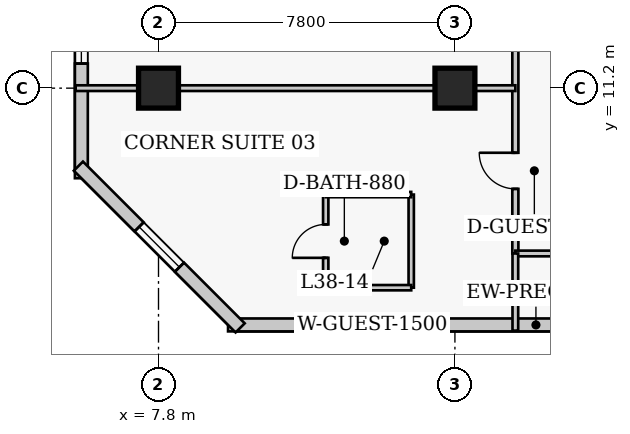
"""IFC4 building model, lengths in metres.
Left out: names, types, materials, properties, quantities, classifications, styles, units other than length and angle.
Written with IfcOpenShell. Run it as: python <this file> out.ifc"""

import sys

from ifc_helpers import new_model, si_unit, direction, frame, frame_2d, origin, origin_2d, place, context, subcontext, project, spatial, rectangle, extrude, element, fill, save


model = new_model("IFC4")
c1 = context("Model", 3, precision=1e-05, world=origin(), true_north=direction((0.0, 1.0)))
c2 = subcontext(c1, "Body", "Model", "MODEL_VIEW")
j1 = project(units=[si_unit("LENGTHUNIT", "METRE"), si_unit("PLANEANGLEUNIT", "RADIAN")], contexts=[c1])
p1 = place(None, origin())
s1 = spatial("IfcSite", under=j1, at=p1, CompositionType="ELEMENT")
p2 = place(p1, origin())
s2 = spatial("IfcBuilding", under=s1, at=p2, CompositionType="ELEMENT")
p3 = place(p2, frame((0.0, 0.0, 153.6)))
s3 = spatial("IfcBuildingStorey", under=s2, at=p3, CompositionType="ELEMENT", Elevation=153.6)
for number, where, z_axis, x_axis in (
    (1, (7.8, 11.2, 0.0), (0.0, 0.0, 1.0), (1.0, 0.0, 0.0)),
    (2, (15.6, 11.2, 0.0), (0.0, 0.0, 1.0), (1.0, 0.0, 0.0)),
):
    element("IfcColumn", number, at=place(p3, frame(where, z_axis=z_axis, x_axis=x_axis)), inside=s3, PredefinedType="COLUMN", context=c2, shape_type="SweptSolid", body=[
        extrude(rectangle(XDim=1.05, YDim=1.05, at=origin_2d()), origin(), (0.0, 0.0, 1.0), 3.8),
    ])
p4 = place(p3, frame((9.63, 4.97, 0.0), z_axis=(0.0, 0.0, 1.0), x_axis=(1.0, 0.0, 0.0)))
e3 = element("IfcWall", 3, at=p4, inside=s3, PredefinedType="SOLIDWALL", context=c2, shape_type="SweptSolid", body=[
    extrude(rectangle(XDim=26.69, YDim=0.34, at=frame_2d((13.345, 0.0))), origin(), (0.0, 0.0, 1.0), 3.55),
])
p5 = place(p4, frame((3.048, 0.0, 0.85)))
e4 = element("IfcOpeningElement", 4, at=p5, cuts=e3, PredefinedType="OPENING", context=c2, shape_type="SweptSolid", body=[
    extrude(rectangle(XDim=1.5, YDim=1.75, at=frame_2d((0.75, 0.875))), frame((0.0, 0.18, 0.0), z_axis=(0.0, -1.0, 0.0), x_axis=(1.0, 0.0, 0.0)), (0.0, 0.0, 1.0), 0.36),
])
p6 = place(p4, frame((22.642, 0.0, 0.85)))
e5 = element("IfcOpeningElement", 5, at=p6, cuts=e3, PredefinedType="OPENING", context=c2, shape_type="SweptSolid", body=[
    extrude(rectangle(XDim=1.5, YDim=1.75, at=frame_2d((0.75, 0.875))), frame((0.0, 0.18, 0.0), z_axis=(0.0, -1.0, 0.0), x_axis=(1.0, 0.0, 0.0)), (0.0, 0.0, 1.0), 0.36),
])
p7 = place(p4, frame((11.655, 0.0, 0.85)))
e6 = element("IfcOpeningElement", 6, at=p7, cuts=e3, PredefinedType="OPENING", context=c2, shape_type="SweptSolid", body=[
    extrude(rectangle(XDim=1.3, YDim=1.7, at=frame_2d((0.65, 0.85))), frame((0.0, 0.18, 0.0), z_axis=(0.0, -1.0, 0.0), x_axis=(1.0, 0.0, 0.0)), (0.0, 0.0, 1.0), 0.36),
])
p8 = place(p4, frame((16.715, 0.0, 0.85)))
e7 = element("IfcOpeningElement", 7, at=p8, cuts=e3, PredefinedType="OPENING", context=c2, shape_type="SweptSolid", body=[
    extrude(rectangle(XDim=1.3, YDim=1.7, at=frame_2d((0.65, 0.85))), frame((0.0, 0.18, 0.0), z_axis=(0.0, -1.0, 0.0), x_axis=(1.0, 0.0, 0.0)), (0.0, 0.0, 1.0), 0.36),
])
p9 = place(p3, frame((5.77, 38.97, 0.0), z_axis=(0.0, 0.0, 1.0), x_axis=(0.0, -1.0, 0.0)))
e8 = element("IfcWall", 8, at=p9, inside=s3, PredefinedType="SOLIDWALL", context=c2, shape_type="SweptSolid", body=[
    extrude(rectangle(XDim=30.14, YDim=0.34, at=frame_2d((15.07, 0.0))), origin(), (0.0, 0.0, 1.0), 3.55),
])
p10 = place(p9, frame((3.018, 0.0, 0.85)))
e9 = element("IfcOpeningElement", 9, at=p10, cuts=e8, PredefinedType="OPENING", context=c2, shape_type="SweptSolid", body=[
    extrude(rectangle(XDim=1.5, YDim=1.75, at=frame_2d((0.75, 0.875))), frame((0.0, 0.18, 0.0), z_axis=(0.0, -1.0, 0.0), x_axis=(1.0, 0.0, 0.0)), (0.0, 0.0, 1.0), 0.36),
])
p11 = place(p9, frame((10.552, 0.0, 0.85)))
e10 = element("IfcOpeningElement", 10, at=p11, cuts=e8, PredefinedType="OPENING", context=c2, shape_type="SweptSolid", body=[
    extrude(rectangle(XDim=1.5, YDim=1.75, at=frame_2d((0.75, 0.875))), frame((0.0, 0.18, 0.0), z_axis=(0.0, -1.0, 0.0), x_axis=(1.0, 0.0, 0.0)), (0.0, 0.0, 1.0), 0.36),
])
p12 = place(p9, frame((16.938, 0.0, 0.85)))
e11 = element("IfcOpeningElement", 11, at=p12, cuts=e8, PredefinedType="OPENING", context=c2, shape_type="SweptSolid", body=[
    extrude(rectangle(XDim=1.5, YDim=1.75, at=frame_2d((0.75, 0.875))), frame((0.0, 0.18, 0.0), z_axis=(0.0, -1.0, 0.0), x_axis=(1.0, 0.0, 0.0)), (0.0, 0.0, 1.0), 0.36),
])
p13 = place(p9, frame((25.623, 0.0, 0.85)))
e12 = element("IfcOpeningElement", 12, at=p13, cuts=e8, PredefinedType="OPENING", context=c2, shape_type="SweptSolid", body=[
    extrude(rectangle(XDim=1.5, YDim=1.75, at=frame_2d((0.75, 0.875))), frame((0.0, 0.18, 0.0), z_axis=(0.0, -1.0, 0.0), x_axis=(1.0, 0.0, 0.0)), (0.0, 0.0, 1.0), 0.36),
])
p14 = place(p3, frame((5.692, 9.148, 0.0), z_axis=(0.0, 0.0, 1.0), x_axis=(0.707106781187, -0.707106781187, 0.0)))
e13 = element("IfcWall", 13, at=p14, inside=s3, PredefinedType="SOLIDWALL", context=c2, shape_type="SweptSolid", body=[
    extrude(rectangle(XDim=6.02, YDim=0.34, at=frame_2d((3.01, 0.0))), origin(), (0.0, 0.0, 1.0), 3.55),
])
p15 = place(p14, frame((2.26, 0.0, 0.85)))
e14 = element("IfcOpeningElement", 14, at=p15, cuts=e13, PredefinedType="OPENING", context=c2, shape_type="SweptSolid", body=[
    extrude(rectangle(XDim=1.5, YDim=1.75, at=frame_2d((0.75, 0.875))), frame((0.0, 0.18, 0.0), z_axis=(0.0, -1.0, 0.0), x_axis=(1.0, 0.0, 0.0)), (0.0, 0.0, 1.0), 0.36),
])
p16 = place(p3, frame((17.19, 6.85, 0.0), z_axis=(0.0, 0.0, 1.0), x_axis=(0.0, 1.0, 0.0)))
e15 = element("IfcWall", 15, at=p16, inside=s3, PredefinedType="PARTITIONING", context=c2, shape_type="SweptSolid", body=[
    extrude(rectangle(XDim=33.8, YDim=0.16, at=frame_2d((16.9, 0.0))), origin(), (0.0, 0.0, 1.0), 3.55),
])
p17 = place(p16, frame((1.7, 0.0, 0.0)))
e16 = element("IfcOpeningElement", 16, at=p17, cuts=e15, PredefinedType="OPENING", context=c2, shape_type="SweptSolid", body=[
    extrude(rectangle(XDim=0.95, YDim=2.1, at=frame_2d((0.475, 1.05))), frame((0.0, 0.09, 0.0), z_axis=(0.0, -1.0, 0.0), x_axis=(1.0, 0.0, 0.0)), (0.0, 0.0, 1.0), 0.18),
])
p18 = place(p16, frame((8.275, 0.0, 0.0)))
e17 = element("IfcOpeningElement", 17, at=p18, cuts=e15, PredefinedType="OPENING", context=c2, shape_type="SweptSolid", body=[
    extrude(rectangle(XDim=0.95, YDim=2.1, at=frame_2d((0.475, 1.05))), frame((0.0, 0.09, 0.0), z_axis=(0.0, -1.0, 0.0), x_axis=(1.0, 0.0, 0.0)), (0.0, 0.0, 1.0), 0.18),
])
p19 = place(p16, frame((14.543, 0.0, 0.0)))
e18 = element("IfcOpeningElement", 18, at=p19, cuts=e15, PredefinedType="OPENING", context=c2, shape_type="SweptSolid", body=[
    extrude(rectangle(XDim=0.95, YDim=2.1, at=frame_2d((0.475, 1.05))), frame((0.0, 0.09, 0.0), z_axis=(0.0, -1.0, 0.0), x_axis=(1.0, 0.0, 0.0)), (0.0, 0.0, 1.0), 0.18),
])
p20 = place(p16, frame((32.36, 0.0, 0.0)))
e19 = element("IfcOpeningElement", 19, at=p20, cuts=e15, PredefinedType="OPENING", context=c2, shape_type="SweptSolid", body=[
    extrude(rectangle(XDim=1.0, YDim=2.15, at=frame_2d((0.5, 1.075))), frame((0.0, 0.09, 0.0), z_axis=(0.0, -1.0, 0.0), x_axis=(1.0, 0.0, 0.0)), (0.0, 0.0, 1.0), 0.18),
])
p21 = place(p3, frame((17.19, 6.85, 0.0), z_axis=(0.0, 0.0, 1.0), x_axis=(1.0, 0.0, 0.0)))
e20 = element("IfcWall", 20, at=p21, inside=s3, PredefinedType="PARTITIONING", context=c2, shape_type="SweptSolid", body=[
    extrude(rectangle(XDim=2.22, YDim=0.15, at=frame_2d((1.11, 0.0))), origin(), (0.0, 0.0, 1.0), 3.55),
])
p22 = place(p3, frame((17.19, 4.82, 0.0), z_axis=(0.0, 0.0, 1.0), x_axis=(0.0, 1.0, 0.0)))
e21 = element("IfcWall", 21, at=p22, inside=s3, PredefinedType="PARTITIONING", context=c2, shape_type="SweptSolid", body=[
    extrude(rectangle(XDim=2.03, YDim=0.15, at=frame_2d((1.015, 0.0))), origin(), (0.0, 0.0, 1.0), 3.55),
])
p23 = place(p3, frame((12.2, 5.95, 0.0), z_axis=(0.0, 0.0, 1.0), x_axis=(0.0, 1.0, 0.0)))
e22 = element("IfcWall", 22, at=p23, inside=s3, PredefinedType="PLUMBINGWALL", context=c2, shape_type="SweptSolid", body=[
    extrude(rectangle(XDim=2.45, YDim=0.14, at=frame_2d((1.225, 0.0))), origin(), (0.0, 0.0, 1.0), 3.55),
])
p24 = place(p23, frame((0.785, 0.0, 0.0)))
e23 = element("IfcOpeningElement", 23, at=p24, cuts=e22, PredefinedType="OPENING", context=c2, shape_type="SweptSolid", body=[
    extrude(rectangle(XDim=0.88, YDim=2.05, at=frame_2d((0.44, 1.025))), frame((0.0, 0.08, 0.0), z_axis=(0.0, -1.0, 0.0), x_axis=(1.0, 0.0, 0.0)), (0.0, 0.0, 1.0), 0.16),
])
p25 = place(p3, frame((14.45, 5.95, 0.0), z_axis=(0.0, 0.0, 1.0), x_axis=(0.0, 1.0, 0.0)))
e24 = element("IfcWall", 24, at=p25, inside=s3, PredefinedType="PLUMBINGWALL", context=c2, shape_type="SweptSolid", body=[
    extrude(rectangle(XDim=2.45, YDim=0.14, at=frame_2d((1.225, 0.0))), origin(), (0.0, 0.0, 1.0), 3.55),
])
for number, where, z_axis, x_axis in (
    (25, (12.2, 5.95, 0.0), (0.0, 0.0, 1.0), (1.0, 0.0, 0.0)),
    (26, (12.2, 8.4, 0.0), (0.0, 0.0, 1.0), (1.0, 0.0, 0.0)),
):
    element("IfcWall", number, at=place(p3, frame(where, z_axis=z_axis, x_axis=x_axis)), inside=s3, PredefinedType="PLUMBINGWALL", context=c2, shape_type="SweptSolid", body=[
        extrude(rectangle(XDim=2.25, YDim=0.14, at=frame_2d((1.125, 0.0))), origin(), (0.0, 0.0, 1.0), 3.55),
    ])
p26 = place(p3, frame((5.62, 11.2, 0.0), z_axis=(0.0, 0.0, 1.0), x_axis=(1.0, 0.0, 0.0)))
e27 = element("IfcWall", 27, at=p26, inside=s3, PredefinedType="PARTITIONING", context=c2, shape_type="SweptSolid", body=[
    extrude(rectangle(XDim=11.57, YDim=0.15, at=frame_2d((5.785, 0.0))), origin(), (0.0, 0.0, 1.0), 2.778),
])
p27 = place(p5, origin())
e28 = element("IfcWindow", 28, at=p27, inside=s3, PartitioningType="SINGLE_PANEL", PredefinedType="WINDOW", context=c2, shape_type="SweptSolid", body=[
    extrude(rectangle(XDim=1.5, YDim=1.75, at=frame_2d((0.75, 0.875))), frame((0.0, 0.03, 0.0), z_axis=(0.0, -1.0, 0.0), x_axis=(1.0, 0.0, 0.0)), (0.0, 0.0, 1.0), 0.06),
])
fill(e4, e28)
p28 = place(p13, origin())
e29 = element("IfcWindow", 29, at=p28, inside=s3, PartitioningType="SINGLE_PANEL", PredefinedType="WINDOW", context=c2, shape_type="SweptSolid", body=[
    extrude(rectangle(XDim=1.5, YDim=1.75, at=frame_2d((0.75, 0.875))), frame((0.0, 0.03, 0.0), z_axis=(0.0, -1.0, 0.0), x_axis=(1.0, 0.0, 0.0)), (0.0, 0.0, 1.0), 0.06),
])
fill(e12, e29)
p29 = place(p15, origin())
e30 = element("IfcWindow", 30, at=p29, inside=s3, PartitioningType="SINGLE_PANEL", PredefinedType="WINDOW", context=c2, shape_type="SweptSolid", body=[
    extrude(rectangle(XDim=1.5, YDim=1.75, at=frame_2d((0.75, 0.875))), frame((0.0, 0.03, 0.0), z_axis=(0.0, -1.0, 0.0), x_axis=(1.0, 0.0, 0.0)), (0.0, 0.0, 1.0), 0.06),
])
fill(e14, e30)
p30 = place(p24, origin())
e31 = element("IfcDoor", 31, at=p30, inside=s3, OperationType="SINGLE_SWING_LEFT", PredefinedType="DOOR", context=c2, shape_type="SweptSolid", body=[
    extrude(rectangle(XDim=0.88, YDim=2.05, at=frame_2d((0.44, 1.025))), frame((0.0, 0.025, 0.0), z_axis=(0.0, -1.0, 0.0), x_axis=(1.0, 0.0, 0.0)), (0.0, 0.0, 1.0), 0.05),
])
fill(e23, e31)
p31 = place(p17, origin())
e32 = element("IfcDoor", 32, at=p31, inside=s3, OperationType="SINGLE_SWING_RIGHT", PredefinedType="DOOR", context=c2, shape_type="SweptSolid", body=[
    extrude(rectangle(XDim=0.95, YDim=2.1, at=frame_2d((0.475, 1.05))), frame((0.0, 0.025, 0.0), z_axis=(0.0, -1.0, 0.0), x_axis=(1.0, 0.0, 0.0)), (0.0, 0.0, 1.0), 0.05),
])
fill(e16, e32)
save(model, sys.argv[1])
